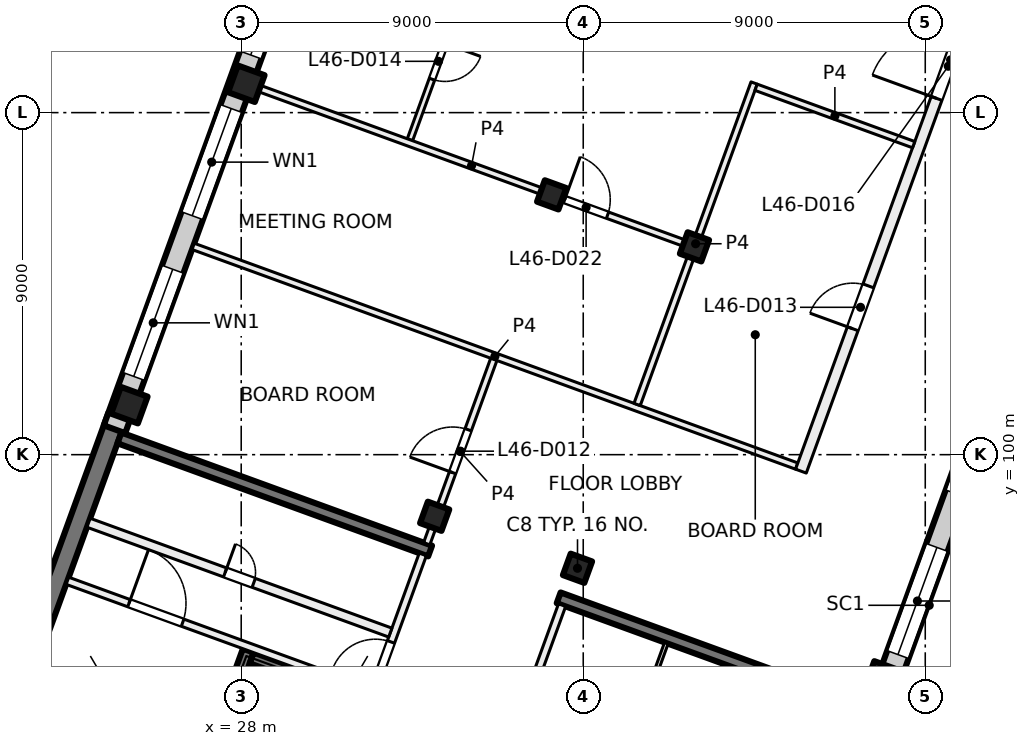
"""IFC4 building model, lengths in metres.
Left out: names, types, materials, properties, quantities, classifications, styles, units other than length and angle.
Written with IfcOpenShell. Run it as: python <this file> out.ifc"""

import sys

from ifc_helpers import new_model, si_unit, direction, frame, frame_2d, origin, origin_2d, place, context, subcontext, project, spatial, rectangle, extrude, element, fill, save


model = new_model("IFC4")
c1 = context("Model", 3, precision=1e-05, world=origin(), true_north=direction((0.0, 1.0)))
c2 = subcontext(c1, "Body", "Model", "MODEL_VIEW")
j1 = project(units=[si_unit("LENGTHUNIT", "METRE"), si_unit("PLANEANGLEUNIT", "RADIAN")], contexts=[c1])
p1 = place(None, origin())
s1 = spatial("IfcSite", under=j1, at=p1, CompositionType="ELEMENT")
p2 = place(p1, origin())
s2 = spatial("IfcBuilding", under=s1, at=p2, CompositionType="ELEMENT")
p3 = place(p2, frame((0.0, 0.0, 196.0)))
s3 = spatial("IfcBuildingStorey", under=s2, at=p3, CompositionType="ELEMENT", Elevation=196.0)
for number, where, z_axis, x_axis in (
    (1, (39.927, 105.468, 0.0), (0.0, 0.0, 1.0), (-0.342, -0.94, 0.0)),
    (2, (36.849, 97.011, 0.0), (0.0, 0.0, 1.0), (-0.342, -0.94, 0.0)),
    (3, (36.169, 106.836, 0.0), (0.0, 0.0, 1.0), (-0.342, -0.94, 0.0)),
    (4, (33.091, 98.379, 0.0), (0.0, 0.0, 1.0), (-0.342, -0.94, 0.0)),
):
    element("IfcColumn", number, at=place(p3, frame(where, z_axis=z_axis, x_axis=x_axis)), inside=s3, PredefinedType="COLUMN", context=c2, shape_type="SweptSolid", body=[
        extrude(rectangle(XDim=0.6, YDim=0.6, at=origin_2d()), origin(), (0.0, 0.0, 1.0), 4.0),
    ])
for number, where, z_axis, x_axis in (
    (5, (44.884, 94.087, 0.0), (0.0, 0.0, 1.0), (-0.342, -0.94, 0.0)),
    (6, (28.134, 109.76, 0.0), (0.0, 0.0, 1.0), (-0.342, -0.94, 0.0)),
    (7, (25.056, 101.303, 0.0), (0.0, 0.0, 1.0), (-0.342, -0.94, 0.0)),
):
    element("IfcColumn", number, at=place(p3, frame(where, z_axis=z_axis, x_axis=x_axis)), inside=s3, PredefinedType="COLUMN", context=c2, shape_type="SweptSolid", body=[
        extrude(rectangle(XDim=0.75, YDim=0.75, at=origin_2d()), origin(), (0.0, 0.0, 1.0), 4.0),
    ])
p4 = place(p3, frame((21.67, 92.585, 0.0), z_axis=(0.0, 0.0, 1.0), x_axis=(0.342035714298, 0.93968695327, 0.0)))
e8 = element("IfcWall", 8, at=p4, inside=s3, PredefinedType="SHEAR", context=c2, shape_type="SweptSolid", body=[
    extrude(rectangle(XDim=8.975, YDim=0.5, at=frame_2d((4.488, 0.0))), origin(), (0.0, 0.0, 1.0), 4.0),
])
p5 = place(p3, frame((23.996, 83.332, 0.0), z_axis=(0.0, 0.0, 1.0), x_axis=(0.342016684409, 0.939693879721, 0.0)))
e9 = element("IfcWall", 9, at=p5, inside=s3, PredefinedType="SHEAR", context=c2, shape_type="SweptSolid", body=[
    extrude(rectangle(XDim=12.25, YDim=0.3, at=frame_2d((6.125, 0.0))), origin(), (0.0, 0.0, 1.0), 4.0),
])
p6 = place(p5, frame((8.0, 0.0, 0.0)))
e10 = element("IfcOpeningElement", 10, at=p6, cuts=e9, PredefinedType="OPENING", context=c2, shape_type="SweptSolid", body=[
    extrude(rectangle(XDim=1.1, YDim=2.1, at=frame_2d((0.55, 1.05))), frame((0.0, 0.16, 0.0), z_axis=(0.0, -1.0, 0.0), x_axis=(1.0, 0.0, 0.0)), (0.0, 0.0, 1.0), 0.32),
])
p7 = place(p3, frame((31.188, 93.591, 0.0), z_axis=(0.0, 0.0, 1.0), x_axis=(-0.939680694448, 0.342052908892, 0.0)))
e11 = element("IfcWall", 11, at=p7, inside=s3, PredefinedType="SHEAR", context=c2, shape_type="SweptSolid", body=[
    extrude(rectangle(XDim=3.1, YDim=0.3, at=frame_2d((1.55, 0.0))), origin(), (0.0, 0.0, 1.0), 4.0),
])
p8 = place(p3, frame((44.529, 93.258, 0.0), z_axis=(0.0, 0.0, 1.0), x_axis=(-0.9396917844, 0.342022441267, 0.0)))
e12 = element("IfcWall", 12, at=p8, inside=s3, PredefinedType="SHEAR", context=c2, shape_type="SweptSolid", body=[
    extrude(rectangle(XDim=8.7, YDim=0.3, at=frame_2d((4.35, 0.0))), origin(), (0.0, 0.0, 1.0), 4.0),
])
p9 = place(p3, frame((32.971, 97.465, 0.0), z_axis=(0.0, 0.0, 1.0), x_axis=(-0.939695066972, 0.34201342241, 0.0)))
e13 = element("IfcWall", 13, at=p9, inside=s3, PredefinedType="SHEAR", context=c2, shape_type="SweptSolid", body=[
    extrude(rectangle(XDim=8.7, YDim=0.3, at=frame_2d((4.35, 0.0))), origin(), (0.0, 0.0, 1.0), 4.0),
])
p10 = place(p3, frame((52.212, 113.783, 0.0), z_axis=(0.0, 0.0, 1.0), x_axis=(-0.34202521188, -0.939690775968, 0.0)))
e14 = element("IfcWall", 14, at=p10, inside=s3, PredefinedType="SOLIDWALL", context=c2, shape_type="SweptSolid", body=[
    extrude(rectangle(XDim=21.745, YDim=0.6, at=frame_2d((10.873, 0.0))), origin(), (0.0, 0.0, 1.0), 3.625),
])
p11 = place(p10, frame((3.765, 0.0, 0.9)))
e15 = element("IfcOpeningElement", 15, at=p11, cuts=e14, PredefinedType="OPENING", context=c2, shape_type="SweptSolid", body=[
    extrude(rectangle(XDim=3.0, YDim=2.4, at=frame_2d((1.5, 1.2))), frame((0.0, 0.31, 0.0), z_axis=(0.0, -1.0, 0.0), x_axis=(1.0, 0.0, 0.0)), (0.0, 0.0, 1.0), 0.62),
])
p12 = place(p10, frame((8.265, 0.0, 0.9)))
e16 = element("IfcOpeningElement", 16, at=p12, cuts=e14, PredefinedType="OPENING", context=c2, shape_type="SweptSolid", body=[
    extrude(rectangle(XDim=3.0, YDim=2.4, at=frame_2d((1.5, 1.2))), frame((0.0, 0.31, 0.0), z_axis=(0.0, -1.0, 0.0), x_axis=(1.0, 0.0, 0.0)), (0.0, 0.0, 1.0), 0.62),
])
p13 = place(p10, frame((12.765, 0.0, 0.9)))
e17 = element("IfcOpeningElement", 17, at=p13, cuts=e14, PredefinedType="OPENING", context=c2, shape_type="SweptSolid", body=[
    extrude(rectangle(XDim=3.0, YDim=2.4, at=frame_2d((1.5, 1.2))), frame((0.0, 0.31, 0.0), z_axis=(0.0, -1.0, 0.0), x_axis=(1.0, 0.0, 0.0)), (0.0, 0.0, 1.0), 0.62),
])
p14 = place(p10, frame((17.265, 0.0, 0.9)))
e18 = element("IfcOpeningElement", 18, at=p14, cuts=e14, PredefinedType="OPENING", context=c2, shape_type="SweptSolid", body=[
    extrude(rectangle(XDim=3.0, YDim=2.4, at=frame_2d((1.5, 1.2))), frame((0.0, 0.31, 0.0), z_axis=(0.0, -1.0, 0.0), x_axis=(1.0, 0.0, 0.0)), (0.0, 0.0, 1.0), 0.62),
])
p15 = place(p3, frame((24.666, 100.669, 0.0), z_axis=(0.0, 0.0, 1.0), x_axis=(0.34201964167, 0.939692803373, 0.0)))
e19 = element("IfcWall", 19, at=p15, inside=s3, PredefinedType="SOLIDWALL", context=c2, shape_type="SweptSolid", body=[
    extrude(rectangle(XDim=32.884, YDim=0.6, at=frame_2d((16.442, 0.0))), origin(), (0.0, 0.0, 1.0), 3.625),
])
p16 = place(p15, frame((1.48, 0.0, 0.9)))
e20 = element("IfcOpeningElement", 20, at=p16, cuts=e19, PredefinedType="OPENING", context=c2, shape_type="SweptSolid", body=[
    extrude(rectangle(XDim=3.0, YDim=2.4, at=frame_2d((1.5, 1.2))), frame((0.0, 0.31, 0.0), z_axis=(0.0, -1.0, 0.0), x_axis=(1.0, 0.0, 0.0)), (0.0, 0.0, 1.0), 0.62),
])
p17 = place(p15, frame((5.98, 0.0, 0.9)))
e21 = element("IfcOpeningElement", 21, at=p17, cuts=e19, PredefinedType="OPENING", context=c2, shape_type="SweptSolid", body=[
    extrude(rectangle(XDim=3.0, YDim=2.4, at=frame_2d((1.5, 1.2))), frame((0.0, 0.31, 0.0), z_axis=(0.0, -1.0, 0.0), x_axis=(1.0, 0.0, 0.0)), (0.0, 0.0, 1.0), 0.62),
])
p18 = place(p15, frame((10.48, 0.0, 0.9)))
e22 = element("IfcOpeningElement", 22, at=p18, cuts=e19, PredefinedType="OPENING", context=c2, shape_type="SweptSolid", body=[
    extrude(rectangle(XDim=3.0, YDim=2.4, at=frame_2d((1.5, 1.2))), frame((0.0, 0.31, 0.0), z_axis=(0.0, -1.0, 0.0), x_axis=(1.0, 0.0, 0.0)), (0.0, 0.0, 1.0), 0.62),
])
p19 = place(p15, frame((14.98, 0.0, 0.9)))
e23 = element("IfcOpeningElement", 23, at=p19, cuts=e19, PredefinedType="OPENING", context=c2, shape_type="SweptSolid", body=[
    extrude(rectangle(XDim=3.0, YDim=2.4, at=frame_2d((1.5, 1.2))), frame((0.0, 0.31, 0.0), z_axis=(0.0, -1.0, 0.0), x_axis=(1.0, 0.0, 0.0)), (0.0, 0.0, 1.0), 0.62),
])
p20 = place(p15, frame((19.48, 0.0, 0.9)))
e24 = element("IfcOpeningElement", 24, at=p20, cuts=e19, PredefinedType="OPENING", context=c2, shape_type="SweptSolid", body=[
    extrude(rectangle(XDim=3.0, YDim=2.4, at=frame_2d((1.5, 1.2))), frame((0.0, 0.31, 0.0), z_axis=(0.0, -1.0, 0.0), x_axis=(1.0, 0.0, 0.0)), (0.0, 0.0, 1.0), 0.62),
])
p21 = place(p15, frame((23.98, 0.0, 0.9)))
e25 = element("IfcOpeningElement", 25, at=p21, cuts=e19, PredefinedType="OPENING", context=c2, shape_type="SweptSolid", body=[
    extrude(rectangle(XDim=3.0, YDim=2.4, at=frame_2d((1.5, 1.2))), frame((0.0, 0.31, 0.0), z_axis=(0.0, -1.0, 0.0), x_axis=(1.0, 0.0, 0.0)), (0.0, 0.0, 1.0), 0.62),
])
p22 = place(p15, frame((28.48, 0.0, 0.9)))
e26 = element("IfcOpeningElement", 26, at=p22, cuts=e19, PredefinedType="OPENING", context=c2, shape_type="SweptSolid", body=[
    extrude(rectangle(XDim=3.0, YDim=2.4, at=frame_2d((1.5, 1.2))), frame((0.0, 0.31, 0.0), z_axis=(0.0, -1.0, 0.0), x_axis=(1.0, 0.0, 0.0)), (0.0, 0.0, 1.0), 0.62),
])
p23 = place(p3, frame((31.427, 93.663, 0.0), z_axis=(0.0, 0.0, 1.0), x_axis=(0.342030870568, 0.93968871632, 0.0)))
e27 = element("IfcWall", 27, at=p23, inside=s3, PredefinedType="PARTITIONING", context=c2, shape_type="SweptSolid", body=[
    extrude(rectangle(XDim=3.95, YDim=0.2, at=frame_2d((1.975, 0.0))), origin(), (0.0, 0.0, 1.0), 3.625),
])
p24 = place(p23, frame((0.3, 0.0, 0.0)))
e28 = element("IfcOpeningElement", 28, at=p24, cuts=e27, PredefinedType="OPENING", context=c2, shape_type="SweptSolid", body=[
    extrude(rectangle(XDim=1.2, YDim=2.1, at=frame_2d((0.6, 1.05))), frame((0.0, 0.11, 0.0), z_axis=(0.0, -1.0, 0.0), x_axis=(1.0, 0.0, 0.0)), (0.0, 0.0, 1.0), 0.22),
])
p25 = place(p3, frame((23.427, 96.682, 0.0), z_axis=(0.0, 0.0, 1.0), x_axis=(0.939690465531, -0.342026064782, 0.0)))
e29 = element("IfcWall", 29, at=p25, inside=s3, PredefinedType="PARTITIONING", context=c2, shape_type="SweptSolid", body=[
    extrude(rectangle(XDim=8.45, YDim=0.2, at=frame_2d((4.225, 0.0))), origin(), (0.0, 0.0, 1.0), 3.625),
])
p26 = place(p25, frame((1.725, 0.0, 0.0)))
e30 = element("IfcOpeningElement", 30, at=p26, cuts=e29, PredefinedType="OPENING", context=c2, shape_type="SweptSolid", body=[
    extrude(rectangle(XDim=1.5, YDim=2.1, at=frame_2d((0.75, 1.05))), frame((0.0, 0.11, 0.0), z_axis=(0.0, -1.0, 0.0), x_axis=(1.0, 0.0, 0.0)), (0.0, 0.0, 1.0), 0.22),
])
p27 = place(p3, frame((23.983, 98.208, 0.0), z_axis=(0.0, 0.0, 1.0), x_axis=(0.939699751196, -0.342000552051, 0.0)))
e31 = element("IfcWall", 31, at=p27, inside=s3, PredefinedType="PARTITIONING", context=c2, shape_type="SweptSolid", body=[
    extrude(rectangle(XDim=8.45, YDim=0.25, at=frame_2d((4.225, 0.0))), origin(), (0.0, 0.0, 1.0), 3.625),
])
p28 = place(p27, frame((3.825, 0.0, 0.0)))
e32 = element("IfcOpeningElement", 32, at=p28, cuts=e31, PredefinedType="OPENING", context=c2, shape_type="SweptSolid", body=[
    extrude(rectangle(XDim=0.8, YDim=2.1, at=frame_2d((0.4, 1.05))), frame((0.0, 0.135, 0.0), z_axis=(0.0, -1.0, 0.0), x_axis=(1.0, 0.0, 0.0)), (0.0, 0.0, 1.0), 0.27),
])
p29 = place(p3, frame((36.443, 96.041, 0.0), z_axis=(0.0, 0.0, 1.0), x_axis=(-0.341996156931, -0.939701350773, 0.0)))
e33 = element("IfcWall", 33, at=p29, inside=s3, PredefinedType="PARTITIONING", context=c2, shape_type="SweptSolid", body=[
    extrude(rectangle(XDim=3.95, YDim=0.2, at=frame_2d((1.975, 0.0))), origin(), (0.0, 0.0, 1.0), 3.625),
])
p30 = place(p29, frame((2.45, 0.0, 0.0)))
e34 = element("IfcOpeningElement", 34, at=p30, cuts=e33, PredefinedType="OPENING", context=c2, shape_type="SweptSolid", body=[
    extrude(rectangle(XDim=1.2, YDim=2.1, at=frame_2d((0.6, 1.05))), frame((0.0, 0.11, 0.0), z_axis=(0.0, -1.0, 0.0), x_axis=(1.0, 0.0, 0.0)), (0.0, 0.0, 1.0), 0.22),
])
p31 = place(p3, frame((39.187, 95.042, 0.0), z_axis=(0.0, 0.0, 1.0), x_axis=(-0.342023078919, -0.939691552312, 0.0)))
e35 = element("IfcWall", 35, at=p31, inside=s3, PredefinedType="PARTITIONING", context=c2, shape_type="SweptSolid", body=[
    extrude(rectangle(XDim=2.1, YDim=0.1, at=frame_2d((1.05, 0.0))), origin(), (0.0, 0.0, 1.0), 3.625),
])
p32 = place(p3, frame((26.736, 105.48, 0.0), z_axis=(0.0, 0.0, 1.0), x_axis=(0.939695108427, -0.342013308511, 0.0)))
e36 = element("IfcWall", 36, at=p32, inside=s3, PredefinedType="PARTITIONING", context=c2, shape_type="SweptSolid", body=[
    extrude(rectangle(XDim=16.9, YDim=0.175, at=frame_2d((8.45, 0.0))), origin(), (0.0, 0.0, 1.0), 3.625),
])
p33 = place(p3, frame((38.54, 125.049, 0.0), z_axis=(0.0, 0.0, 1.0), x_axis=(-0.341960632782, -0.939714278719, 0.0)))
e37 = element("IfcWall", 37, at=p33, inside=s3, PredefinedType="PARTITIONING", context=c2, shape_type="SweptSolid", body=[
    extrude(rectangle(XDim=17.839, YDim=0.15, at=frame_2d((8.919, 0.0))), origin(), (0.0, 0.0, 1.0), 3.625),
])
p34 = place(p33, frame((15.142, 0.0, 0.0)))
e38 = element("IfcOpeningElement", 38, at=p34, cuts=e37, PredefinedType="OPENING", context=c2, shape_type="SweptSolid", body=[
    extrude(rectangle(XDim=1.0, YDim=2.1, at=frame_2d((0.5, 1.05))), frame((0.0, 0.085, 0.0), z_axis=(0.0, -1.0, 0.0), x_axis=(1.0, 0.0, 0.0)), (0.0, 0.0, 1.0), 0.17),
])
p35 = place(p33, frame((10.675, 0.0, 0.0)))
e39 = element("IfcOpeningElement", 39, at=p35, cuts=e37, PredefinedType="OPENING", context=c2, shape_type="SweptSolid", body=[
    extrude(rectangle(XDim=1.0, YDim=2.1, at=frame_2d((0.5, 1.05))), frame((0.0, 0.085, 0.0), z_axis=(0.0, -1.0, 0.0), x_axis=(1.0, 0.0, 0.0)), (0.0, 0.0, 1.0), 0.17),
])
p36 = place(p33, frame((6.176, 0.0, 0.0)))
e40 = element("IfcOpeningElement", 40, at=p36, cuts=e37, PredefinedType="OPENING", context=c2, shape_type="SweptSolid", body=[
    extrude(rectangle(XDim=1.0, YDim=2.1, at=frame_2d((0.5, 1.05))), frame((0.0, 0.085, 0.0), z_axis=(0.0, -1.0, 0.0), x_axis=(1.0, 0.0, 0.0)), (0.0, 0.0, 1.0), 0.17),
])
p37 = place(p33, frame((1.703, 0.0, 0.0)))
e41 = element("IfcOpeningElement", 41, at=p37, cuts=e37, PredefinedType="OPENING", context=c2, shape_type="SweptSolid", body=[
    extrude(rectangle(XDim=1.0, YDim=2.1, at=frame_2d((0.5, 1.05))), frame((0.0, 0.085, 0.0), z_axis=(0.0, -1.0, 0.0), x_axis=(1.0, 0.0, 0.0)), (0.0, 0.0, 1.0), 0.17),
])
p38 = place(p3, frame((32.881, 97.657, 0.0), z_axis=(0.0, 0.0, 1.0), x_axis=(0.342058204353, 0.939678766832, 0.0)))
e42 = element("IfcWall", 42, at=p38, inside=s3, PredefinedType="PARTITIONING", context=c2, shape_type="SweptSolid", body=[
    extrude(rectangle(XDim=5.163, YDim=0.175, at=frame_2d((2.581, 0.0))), origin(), (0.0, 0.0, 1.0), 3.625),
])
p39 = place(p38, frame((1.991, 0.0, 0.0)))
e43 = element("IfcOpeningElement", 43, at=p39, cuts=e42, PredefinedType="OPENING", context=c2, shape_type="SweptSolid", body=[
    extrude(rectangle(XDim=1.2, YDim=2.1, at=frame_2d((0.6, 1.05))), frame((0.0, 0.097, 0.0), z_axis=(0.0, -1.0, 0.0), x_axis=(1.0, 0.0, 0.0)), (0.0, 0.0, 1.0), 0.195),
])
p40 = place(p3, frame((38.418, 101.321, 0.0), z_axis=(0.0, 0.0, 1.0), x_axis=(0.342082778631, 0.939669821035, 0.0)))
e44 = element("IfcWall", 44, at=p40, inside=s3, PredefinedType="PARTITIONING", context=c2, shape_type="SweptSolid", body=[
    extrude(rectangle(XDim=9.001, YDim=0.175, at=frame_2d((4.5, 0.0))), origin(), (0.0, 0.0, 1.0), 3.625),
])
p41 = place(p3, frame((28.275, 109.709, 0.0), z_axis=(0.0, 0.0, 1.0), x_axis=(0.939707717516, -0.341978662553, 0.0)))
e45 = element("IfcWall", 45, at=p41, inside=s3, PredefinedType="PARTITIONING", context=c2, shape_type="SweptSolid", body=[
    extrude(rectangle(XDim=12.313, YDim=0.175, at=frame_2d((6.157, 0.0))), origin(), (0.0, 0.0, 1.0), 3.625),
])
p42 = place(p41, frame((8.765, 0.0, 0.0)))
e46 = element("IfcOpeningElement", 46, at=p42, cuts=e45, PredefinedType="OPENING", context=c2, shape_type="SweptSolid", body=[
    extrude(rectangle(XDim=1.2, YDim=2.1, at=frame_2d((0.6, 1.05))), frame((0.0, 0.097, 0.0), z_axis=(0.0, -1.0, 0.0), x_axis=(1.0, 0.0, 0.0)), (0.0, 0.0, 1.0), 0.195),
])
p43 = place(p3, frame((42.728, 99.567, 0.0), z_axis=(0.0, 0.0, 1.0), x_axis=(0.342015412648, 0.939694342598, 0.0)))
e47 = element("IfcWall", 47, at=p43, inside=s3, PredefinedType="PARTITIONING", context=c2, shape_type="SweptSolid", body=[
    extrude(rectangle(XDim=23.031, YDim=0.3, at=frame_2d((11.516, 0.0))), origin(), (0.0, 0.0, 1.0), 3.625),
])
p44 = place(p43, frame((3.987, 0.0, 0.0)))
e48 = element("IfcOpeningElement", 48, at=p44, cuts=e47, PredefinedType="OPENING", context=c2, shape_type="SweptSolid", body=[
    extrude(rectangle(XDim=1.2, YDim=2.1, at=frame_2d((0.6, 1.05))), frame((0.0, 0.16, 0.0), z_axis=(0.0, -1.0, 0.0), x_axis=(1.0, 0.0, 0.0)), (0.0, 0.0, 1.0), 0.32),
])
p45 = place(p43, frame((10.437, 0.0, 0.0)))
e49 = element("IfcOpeningElement", 49, at=p45, cuts=e47, PredefinedType="OPENING", context=c2, shape_type="SweptSolid", body=[
    extrude(rectangle(XDim=1.8, YDim=2.1, at=frame_2d((0.9, 1.05))), frame((0.0, 0.16, 0.0), z_axis=(0.0, -1.0, 0.0), x_axis=(1.0, 0.0, 0.0)), (0.0, 0.0, 1.0), 0.32),
])
p46 = place(p43, frame((14.687, 0.0, 0.0)))
e50 = element("IfcOpeningElement", 50, at=p46, cuts=e47, PredefinedType="OPENING", context=c2, shape_type="SweptSolid", body=[
    extrude(rectangle(XDim=0.8, YDim=2.1, at=frame_2d((0.4, 1.05))), frame((0.0, 0.16, 0.0), z_axis=(0.0, -1.0, 0.0), x_axis=(1.0, 0.0, 0.0)), (0.0, 0.0, 1.0), 0.32),
])
p47 = place(p3, frame((45.695, 108.157, 0.0), z_axis=(0.0, 0.0, 1.0), x_axis=(-0.939620446327, 0.342218375959, 0.0)))
e51 = element("IfcWall", 51, at=p47, inside=s3, PredefinedType="PARTITIONING", context=c2, shape_type="SweptSolid", body=[
    extrude(rectangle(XDim=4.412, YDim=0.175, at=frame_2d((2.206, 0.0))), origin(), (0.0, 0.0, 1.0), 3.625),
])
p48 = place(p14, origin())
e52 = element("IfcWindow", 52, at=p48, inside=s3, PartitioningType="SINGLE_PANEL", PredefinedType="WINDOW", context=c2, shape_type="SweptSolid", body=[
    extrude(rectangle(XDim=3.0, YDim=2.4, at=frame_2d((1.5, 1.2))), frame((0.0, 0.03, 0.0), z_axis=(0.0, -1.0, 0.0), x_axis=(1.0, 0.0, 0.0)), (0.0, 0.0, 1.0), 0.06),
])
fill(e18, e52)
p49 = place(p16, origin())
e53 = element("IfcWindow", 53, at=p49, inside=s3, PartitioningType="SINGLE_PANEL", PredefinedType="WINDOW", context=c2, shape_type="SweptSolid", body=[
    extrude(rectangle(XDim=3.0, YDim=2.4, at=frame_2d((1.5, 1.2))), frame((0.0, 0.03, 0.0), z_axis=(0.0, -1.0, 0.0), x_axis=(1.0, 0.0, 0.0)), (0.0, 0.0, 1.0), 0.06),
])
fill(e20, e53)
p50 = place(p17, origin())
e54 = element("IfcWindow", 54, at=p50, inside=s3, PartitioningType="SINGLE_PANEL", PredefinedType="WINDOW", context=c2, shape_type="SweptSolid", body=[
    extrude(rectangle(XDim=3.0, YDim=2.4, at=frame_2d((1.5, 1.2))), frame((0.0, 0.03, 0.0), z_axis=(0.0, -1.0, 0.0), x_axis=(1.0, 0.0, 0.0)), (0.0, 0.0, 1.0), 0.06),
])
fill(e21, e54)
p51 = place(p18, origin())
e55 = element("IfcWindow", 55, at=p51, inside=s3, PartitioningType="SINGLE_PANEL", PredefinedType="WINDOW", context=c2, shape_type="SweptSolid", body=[
    extrude(rectangle(XDim=3.0, YDim=2.4, at=frame_2d((1.5, 1.2))), frame((0.0, 0.03, 0.0), z_axis=(0.0, -1.0, 0.0), x_axis=(1.0, 0.0, 0.0)), (0.0, 0.0, 1.0), 0.06),
])
fill(e22, e55)
p52 = place(p24, origin())
e56 = element("IfcDoor", 56, at=p52, inside=s3, OperationType="DOUBLE_DOOR_SINGLE_SWING", PredefinedType="DOOR", context=c2, shape_type="SweptSolid", body=[
    extrude(rectangle(XDim=1.2, YDim=2.1, at=frame_2d((0.6, 1.05))), frame((0.0, 0.025, 0.0), z_axis=(0.0, -1.0, 0.0), x_axis=(1.0, 0.0, 0.0)), (0.0, 0.0, 1.0), 0.05),
])
fill(e28, e56)
p53 = place(p26, origin())
e57 = element("IfcDoor", 57, at=p53, inside=s3, OperationType="DOUBLE_DOOR_SINGLE_SWING", PredefinedType="DOOR", context=c2, shape_type="SweptSolid", body=[
    extrude(rectangle(XDim=1.5, YDim=2.1, at=frame_2d((0.75, 1.05))), frame((0.0, 0.025, 0.0), z_axis=(0.0, -1.0, 0.0), x_axis=(1.0, 0.0, 0.0)), (0.0, 0.0, 1.0), 0.05),
])
fill(e30, e57)
p54 = place(p28, origin())
e58 = element("IfcDoor", 58, at=p54, inside=s3, OperationType="SINGLE_SWING_LEFT", PredefinedType="DOOR", context=c2, shape_type="SweptSolid", body=[
    extrude(rectangle(XDim=0.8, YDim=2.1, at=frame_2d((0.4, 1.05))), frame((0.0, 0.025, 0.0), z_axis=(0.0, -1.0, 0.0), x_axis=(1.0, 0.0, 0.0)), (0.0, 0.0, 1.0), 0.05),
])
fill(e32, e58)
p55 = place(p39, origin())
e59 = element("IfcDoor", 59, at=p55, inside=s3, OperationType="DOUBLE_DOOR_SINGLE_SWING", PredefinedType="DOOR", context=c2, shape_type="SweptSolid", body=[
    extrude(rectangle(XDim=1.2, YDim=2.1, at=frame_2d((0.6, 1.05))), frame((0.0, 0.025, 0.0), z_axis=(0.0, -1.0, 0.0), x_axis=(1.0, 0.0, 0.0)), (0.0, 0.0, 1.0), 0.05),
])
fill(e43, e59)
p56 = place(p44, origin())
e60 = element("IfcDoor", 60, at=p56, inside=s3, OperationType="DOUBLE_DOOR_SINGLE_SWING", PredefinedType="DOOR", context=c2, shape_type="SweptSolid", body=[
    extrude(rectangle(XDim=1.2, YDim=2.1, at=frame_2d((0.6, 1.05))), frame((0.0, 0.025, 0.0), z_axis=(0.0, -1.0, 0.0), x_axis=(1.0, 0.0, 0.0)), (0.0, 0.0, 1.0), 0.05),
])
fill(e48, e60)
p57 = place(p34, origin())
e61 = element("IfcDoor", 61, at=p57, inside=s3, OperationType="SINGLE_SWING_LEFT", PredefinedType="DOOR", context=c2, shape_type="SweptSolid", body=[
    extrude(rectangle(XDim=1.0, YDim=2.1, at=frame_2d((0.5, 1.05))), frame((0.0, 0.025, 0.0), z_axis=(0.0, -1.0, 0.0), x_axis=(1.0, 0.0, 0.0)), (0.0, 0.0, 1.0), 0.05),
])
fill(e38, e61)
p58 = place(p45, origin())
e62 = element("IfcDoor", 62, at=p58, inside=s3, OperationType="DOUBLE_DOOR_SINGLE_SWING", PredefinedType="DOOR", context=c2, shape_type="SweptSolid", body=[
    extrude(rectangle(XDim=1.8, YDim=2.1, at=frame_2d((0.9, 1.05))), frame((0.0, 0.025, 0.0), z_axis=(0.0, -1.0, 0.0), x_axis=(1.0, 0.0, 0.0)), (0.0, 0.0, 1.0), 0.05),
])
fill(e49, e62)
p59 = place(p42, origin())
e63 = element("IfcDoor", 63, at=p59, inside=s3, OperationType="DOUBLE_DOOR_SINGLE_SWING", PredefinedType="DOOR", context=c2, shape_type="SweptSolid", body=[
    extrude(rectangle(XDim=1.2, YDim=2.1, at=frame_2d((0.6, 1.05))), frame((0.0, 0.025, 0.0), z_axis=(0.0, -1.0, 0.0), x_axis=(1.0, 0.0, 0.0)), (0.0, 0.0, 1.0), 0.05),
])
fill(e46, e63)
save(model, sys.argv[1])
